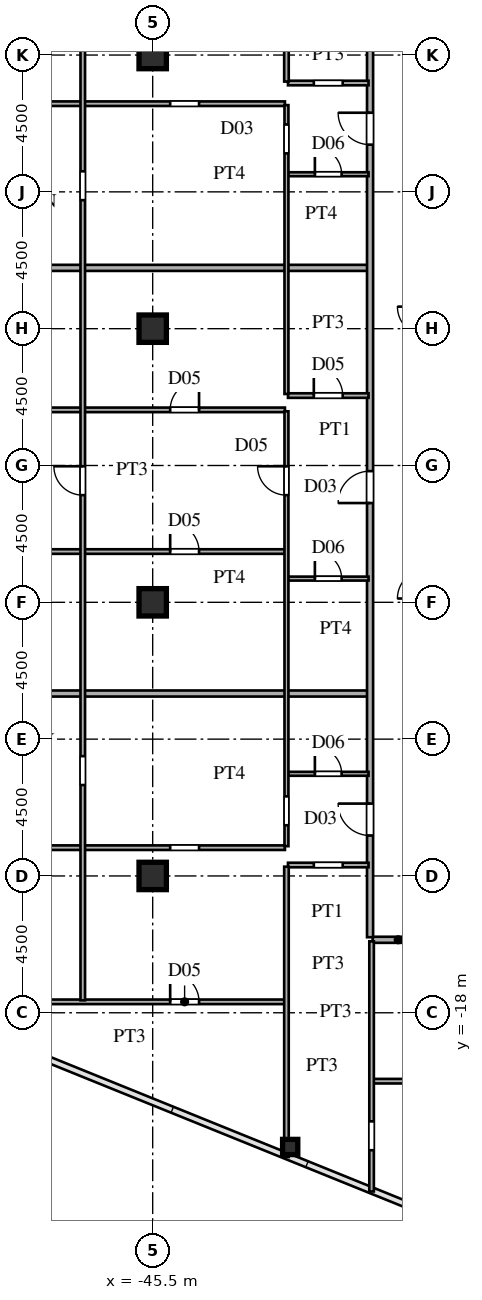
"""IFC4 building model, lengths in metres.
Left out: names, types, materials, properties, quantities, classifications, styles, units other than length and angle.
Written with IfcOpenShell. Run it as: python <this file> out.ifc"""

import sys

from ifc_helpers import new_model, si_unit, direction, frame, frame_2d, origin, origin_2d, place, context, subcontext, project, spatial, rectangle, hollow_rectangle, i_section, extrude, source, transform, mapped, element, fill, save


model = new_model("IFC4")
c1 = context("Model", 3, precision=1e-05, world=origin(), true_north=direction((0.0, 1.0)))
c2 = subcontext(c1, "Body", "Model", "MODEL_VIEW")
j1 = project(units=[si_unit("LENGTHUNIT", "METRE"), si_unit("PLANEANGLEUNIT", "RADIAN")], contexts=[c1])
p1 = place(None, origin())
s1 = spatial("IfcSite", under=j1, at=p1, CompositionType="ELEMENT")
p2 = place(p1, origin())
s2 = spatial("IfcBuilding", under=s1, at=p2, CompositionType="ELEMENT")
p3 = place(p2, frame((0.0, 0.0, 18.9)))
s3 = spatial("IfcBuildingStorey", under=s2, at=p3, CompositionType="ELEMENT", Elevation=18.9)
m1 = source(origin(), c2, "Body", "SweptSolid", [
    extrude(i_section(OverallWidth=0.9, OverallDepth=0.9, WebThickness=0.036, FlangeThickness=0.055, at=origin_2d()), origin(), (0.0, 0.0, 1.0), 3.6),
])
for number, where, z_axis, x_axis in (
    (1, (-45.5, -13.5, 0.0), (0.0, 0.0, 1.0), (1.0, 0.0, 0.0)),
    (2, (-45.5, -4.5, 0.0), (0.0, 0.0, 1.0), (1.0, 0.0, 0.0)),
    (3, (-45.5, 4.5, 0.0), (0.0, 0.0, 1.0), (1.0, 0.0, 0.0)),
    (4, (-45.5, 13.5, 0.0), (0.0, 0.0, 1.0), (1.0, 0.0, 0.0)),
):
    element("IfcColumn", number, at=place(p3, frame(where, z_axis=z_axis, x_axis=x_axis)), inside=s3, PredefinedType="COLUMN", context=c2, shape_type="MappedRepresentation", body=[
        mapped(m1, transform((0.0, 0.0, 0.0), scale=1.0)),
    ])
m2 = source(origin(), c2, "Body", "SweptSolid", [
    extrude(hollow_rectangle(XDim=0.5, YDim=0.5, WallThickness=0.02, at=origin_2d()), origin(), (0.0, 0.0, 1.0), 3.6),
])
p4 = place(p3, frame((-40.977, -22.414, 0.0), z_axis=(0.0, 0.0, 1.0), x_axis=(1.0, 0.0, 0.0)))
e5 = element("IfcColumn", 5, at=p4, inside=s3, PredefinedType="COLUMN", context=c2, shape_type="MappedRepresentation", body=[
    mapped(m2, transform((0.0, 0.0, 0.0), scale=1.0)),
])
p5 = place(p3, frame((-38.25, -20.25, 0.0), z_axis=(0.0, 0.0, 1.0), x_axis=(1.0, 0.0, 0.0)))
e6 = element("IfcWall", 6, at=p5, inside=s3, PredefinedType="PARTITIONING", context=c2, shape_type="SweptSolid", body=[
    extrude(rectangle(XDim=10.785, YDim=0.15, at=frame_2d((5.393, 0.0))), origin(), (0.0, 0.0, 1.0), 3.38),
])
p6 = place(p5, frame((4.875, 0.0, 0.0)))
e7 = element("IfcOpeningElement", 7, at=p6, cuts=e6, PredefinedType="OPENING", context=c2, shape_type="SweptSolid", body=[
    extrude(rectangle(XDim=0.95, YDim=2.15, at=frame_2d((0.475, 1.075))), frame((0.0, 0.085, 0.0), z_axis=(0.0, -1.0, 0.0), x_axis=(1.0, 0.0, 0.0)), (0.0, 0.0, 1.0), 0.17),
])
p7 = place(p3, frame((-53.66, -17.64, 0.0), z_axis=(0.0, 0.0, 1.0), x_axis=(1.0, 0.0, 0.0)))
e8 = element("IfcWall", 8, at=p7, inside=s3, PredefinedType="PARTITIONING", context=c2, shape_type="SweptSolid", body=[
    extrude(rectangle(XDim=12.51, YDim=0.15, at=frame_2d((6.255, 0.0))), origin(), (0.0, 0.0, 1.0), 3.38),
])
p8 = place(p7, frame((8.735, 0.0, 0.0)))
e9 = element("IfcOpeningElement", 9, at=p8, cuts=e8, PredefinedType="OPENING", context=c2, shape_type="SweptSolid", body=[
    extrude(rectangle(XDim=0.95, YDim=2.15, at=frame_2d((0.475, 1.075))), frame((0.0, 0.085, 0.0), z_axis=(0.0, -1.0, 0.0), x_axis=(1.0, 0.0, 0.0)), (0.0, 0.0, 1.0), 0.17),
])
p9 = place(p7, frame((2.659, 0.0, 0.0)))
e10 = element("IfcOpeningElement", 10, at=p9, cuts=e8, PredefinedType="OPENING", context=c2, shape_type="SweptSolid", body=[
    extrude(rectangle(XDim=0.95, YDim=2.15, at=frame_2d((0.475, 1.075))), frame((0.0, 0.085, 0.0), z_axis=(0.0, -1.0, 0.0), x_axis=(1.0, 0.0, 0.0)), (0.0, 0.0, 1.0), 0.17),
])
p10 = place(p3, frame((-38.265, -15.6, 0.0), z_axis=(0.0, 0.0, 1.0), x_axis=(1.0, 0.0, 0.0)))
e11 = element("IfcWall", 11, at=p10, inside=s3, PredefinedType="PARTITIONING", context=c2, shape_type="SweptSolid", body=[
    extrude(rectangle(XDim=1.68, YDim=0.2, at=frame_2d((0.84, 0.0))), origin(), (0.0, 0.0, 1.0), 3.38),
])
p11 = place(p3, frame((-41.05, -13.14, 0.0), z_axis=(0.0, 0.0, 1.0), x_axis=(1.0, 0.0, 0.0)))
e12 = element("IfcWall", 12, at=p11, inside=s3, PredefinedType="PARTITIONING", context=c2, shape_type="SweptSolid", body=[
    extrude(rectangle(XDim=2.65, YDim=0.15, at=frame_2d((1.325, 0.0))), origin(), (0.0, 0.0, 1.0), 3.38),
])
p12 = place(p11, frame((0.85, 0.0, 0.0)))
e13 = element("IfcOpeningElement", 13, at=p12, cuts=e12, PredefinedType="OPENING", context=c2, shape_type="SweptSolid", body=[
    extrude(rectangle(XDim=0.95, YDim=2.15, at=frame_2d((0.475, 1.075))), frame((0.0, 0.085, 0.0), z_axis=(0.0, -1.0, 0.0), x_axis=(1.0, 0.0, 0.0)), (0.0, 0.0, 1.0), 0.17),
])
p13 = place(p3, frame((-66.186, -12.57, 0.0), z_axis=(0.0, 0.0, 1.0), x_axis=(1.0, 0.0, 0.0)))
e14 = element("IfcWall", 14, at=p13, inside=s3, PredefinedType="PARTITIONING", context=c2, shape_type="SweptSolid", body=[
    extrude(rectangle(XDim=25.036, YDim=0.15, at=frame_2d((12.518, 0.0))), origin(), (0.0, 0.0, 1.0), 3.38),
])
p14 = place(p13, frame((21.261, 0.0, 0.0)))
e15 = element("IfcOpeningElement", 15, at=p14, cuts=e14, PredefinedType="OPENING", context=c2, shape_type="SweptSolid", body=[
    extrude(rectangle(XDim=0.95, YDim=2.15, at=frame_2d((0.475, 1.075))), frame((0.0, 0.085, 0.0), z_axis=(0.0, -1.0, 0.0), x_axis=(1.0, 0.0, 0.0)), (0.0, 0.0, 1.0), 0.17),
])
p15 = place(p13, frame((8.361, 0.0, 0.0)))
e16 = element("IfcOpeningElement", 16, at=p15, cuts=e14, PredefinedType="OPENING", context=c2, shape_type="SweptSolid", body=[
    extrude(rectangle(XDim=0.95, YDim=2.15, at=frame_2d((0.475, 1.075))), frame((0.0, 0.085, 0.0), z_axis=(0.0, -1.0, 0.0), x_axis=(1.0, 0.0, 0.0)), (0.0, 0.0, 1.0), 0.17),
])
p16 = place(p3, frame((-41.05, -10.14, 0.0), z_axis=(0.0, 0.0, 1.0), x_axis=(1.0, 0.0, 0.0)))
e17 = element("IfcWall", 17, at=p16, inside=s3, PredefinedType="PARTITIONING", context=c2, shape_type="SweptSolid", body=[
    extrude(rectangle(XDim=2.65, YDim=0.13, at=frame_2d((1.325, 0.0))), origin(), (0.0, 0.0, 1.0), 3.38),
])
p17 = place(p16, frame((0.885, 0.0, 0.0)))
e18 = element("IfcOpeningElement", 18, at=p17, cuts=e17, PredefinedType="OPENING", context=c2, shape_type="SweptSolid", body=[
    extrude(rectangle(XDim=0.88, YDim=2.1, at=frame_2d((0.44, 1.05))), frame((0.0, 0.075, 0.0), z_axis=(0.0, -1.0, 0.0), x_axis=(1.0, 0.0, 0.0)), (0.0, 0.0, 1.0), 0.15),
])
p18 = place(p3, frame((-72.505, -7.5, 0.0), z_axis=(0.0, 0.0, 1.0), x_axis=(1.0, 0.0, 0.0)))
e19 = element("IfcWall", 19, at=p18, inside=s3, PredefinedType="PARTITIONING", context=c2, shape_type="SweptSolid", body=[
    extrude(rectangle(XDim=34.075, YDim=0.2, at=frame_2d((17.038, 0.0))), origin(), (0.0, 0.0, 1.0), 3.38),
])
p19 = place(p3, frame((-41.05, -3.72, 0.0), z_axis=(0.0, 0.0, 1.0), x_axis=(1.0, 0.0, 0.0)))
e20 = element("IfcWall", 20, at=p19, inside=s3, PredefinedType="PARTITIONING", context=c2, shape_type="SweptSolid", body=[
    extrude(rectangle(XDim=2.65, YDim=0.13, at=frame_2d((1.325, 0.0))), origin(), (0.0, 0.0, 1.0), 3.38),
])
p20 = place(p19, frame((0.885, 0.0, 0.0)))
e21 = element("IfcOpeningElement", 21, at=p20, cuts=e20, PredefinedType="OPENING", context=c2, shape_type="SweptSolid", body=[
    extrude(rectangle(XDim=0.88, YDim=2.1, at=frame_2d((0.44, 1.05))), frame((0.0, 0.075, 0.0), z_axis=(0.0, -1.0, 0.0), x_axis=(1.0, 0.0, 0.0)), (0.0, 0.0, 1.0), 0.15),
])
p21 = place(p3, frame((-72.535, -2.83, 0.0), z_axis=(0.0, 0.0, 1.0), x_axis=(1.0, 0.0, 0.0)))
e22 = element("IfcWall", 22, at=p21, inside=s3, PredefinedType="PARTITIONING", context=c2, shape_type="SweptSolid", body=[
    extrude(rectangle(XDim=31.385, YDim=0.15, at=frame_2d((15.692, 0.0))), origin(), (0.0, 0.0, 1.0), 3.38),
])
p22 = place(p21, frame((27.61, 0.0, 0.0)))
e23 = element("IfcOpeningElement", 23, at=p22, cuts=e22, PredefinedType="OPENING", context=c2, shape_type="SweptSolid", body=[
    extrude(rectangle(XDim=0.95, YDim=2.15, at=frame_2d((0.475, 1.075))), frame((0.0, 0.085, 0.0), z_axis=(0.0, -1.0, 0.0), x_axis=(1.0, 0.0, 0.0)), (0.0, 0.0, 1.0), 0.17),
])
p23 = place(p21, frame((14.71, 0.0, 0.0)))
e24 = element("IfcOpeningElement", 24, at=p23, cuts=e22, PredefinedType="OPENING", context=c2, shape_type="SweptSolid", body=[
    extrude(rectangle(XDim=0.95, YDim=2.15, at=frame_2d((0.475, 1.075))), frame((0.0, 0.085, 0.0), z_axis=(0.0, -1.0, 0.0), x_axis=(1.0, 0.0, 0.0)), (0.0, 0.0, 1.0), 0.17),
])
p24 = place(p3, frame((-72.535, 1.83, 0.0), z_axis=(0.0, 0.0, 1.0), x_axis=(1.0, 0.0, 0.0)))
e25 = element("IfcWall", 25, at=p24, inside=s3, PredefinedType="PARTITIONING", context=c2, shape_type="SweptSolid", body=[
    extrude(rectangle(XDim=31.385, YDim=0.15, at=frame_2d((15.692, 0.0))), origin(), (0.0, 0.0, 1.0), 3.38),
])
p25 = place(p24, frame((27.61, 0.0, 0.0)))
e26 = element("IfcOpeningElement", 26, at=p25, cuts=e25, PredefinedType="OPENING", context=c2, shape_type="SweptSolid", body=[
    extrude(rectangle(XDim=0.95, YDim=2.15, at=frame_2d((0.475, 1.075))), frame((0.0, 0.085, 0.0), z_axis=(0.0, -1.0, 0.0), x_axis=(1.0, 0.0, 0.0)), (0.0, 0.0, 1.0), 0.17),
])
p26 = place(p24, frame((14.71, 0.0, 0.0)))
e27 = element("IfcOpeningElement", 27, at=p26, cuts=e25, PredefinedType="OPENING", context=c2, shape_type="SweptSolid", body=[
    extrude(rectangle(XDim=0.95, YDim=2.15, at=frame_2d((0.475, 1.075))), frame((0.0, 0.085, 0.0), z_axis=(0.0, -1.0, 0.0), x_axis=(1.0, 0.0, 0.0)), (0.0, 0.0, 1.0), 0.17),
])
p27 = place(p3, frame((-41.05, 2.3, 0.0), z_axis=(0.0, 0.0, 1.0), x_axis=(1.0, 0.0, 0.0)))
e28 = element("IfcWall", 28, at=p27, inside=s3, PredefinedType="PARTITIONING", context=c2, shape_type="SweptSolid", body=[
    extrude(rectangle(XDim=2.65, YDim=0.15, at=frame_2d((1.325, 0.0))), origin(), (0.0, 0.0, 1.0), 3.38),
])
p28 = place(p27, frame((0.85, 0.0, 0.0)))
e29 = element("IfcOpeningElement", 29, at=p28, cuts=e28, PredefinedType="OPENING", context=c2, shape_type="SweptSolid", body=[
    extrude(rectangle(XDim=0.95, YDim=2.15, at=frame_2d((0.475, 1.075))), frame((0.0, 0.085, 0.0), z_axis=(0.0, -1.0, 0.0), x_axis=(1.0, 0.0, 0.0)), (0.0, 0.0, 1.0), 0.17),
])
p29 = place(p3, frame((-72.505, 6.5, 0.0), z_axis=(0.0, 0.0, 1.0), x_axis=(1.0, 0.0, 0.0)))
e30 = element("IfcWall", 30, at=p29, inside=s3, PredefinedType="PARTITIONING", context=c2, shape_type="SweptSolid", body=[
    extrude(rectangle(XDim=34.075, YDim=0.2, at=frame_2d((17.038, 0.0))), origin(), (0.0, 0.0, 1.0), 3.38),
])
p30 = place(p3, frame((-41.05, 9.58, 0.0), z_axis=(0.0, 0.0, 1.0), x_axis=(1.0, 0.0, 0.0)))
e31 = element("IfcWall", 31, at=p30, inside=s3, PredefinedType="PARTITIONING", context=c2, shape_type="SweptSolid", body=[
    extrude(rectangle(XDim=2.65, YDim=0.13, at=frame_2d((1.325, 0.0))), origin(), (0.0, 0.0, 1.0), 3.38),
])
p31 = place(p30, frame((0.885, 0.0, 0.0)))
e32 = element("IfcOpeningElement", 32, at=p31, cuts=e31, PredefinedType="OPENING", context=c2, shape_type="SweptSolid", body=[
    extrude(rectangle(XDim=0.88, YDim=2.1, at=frame_2d((0.44, 1.05))), frame((0.0, 0.075, 0.0), z_axis=(0.0, -1.0, 0.0), x_axis=(1.0, 0.0, 0.0)), (0.0, 0.0, 1.0), 0.15),
])
p32 = place(p3, frame((-67.833, 11.9, 0.0), z_axis=(0.0, 0.0, 1.0), x_axis=(1.0, 0.0, 0.0)))
e33 = element("IfcWall", 33, at=p32, inside=s3, PredefinedType="PARTITIONING", context=c2, shape_type="SweptSolid", body=[
    extrude(rectangle(XDim=26.683, YDim=0.15, at=frame_2d((13.342, 0.0))), origin(), (0.0, 0.0, 1.0), 3.38),
])
p33 = place(p32, frame((22.908, 0.0, 0.0)))
e34 = element("IfcOpeningElement", 34, at=p33, cuts=e33, PredefinedType="OPENING", context=c2, shape_type="SweptSolid", body=[
    extrude(rectangle(XDim=0.95, YDim=2.15, at=frame_2d((0.475, 1.075))), frame((0.0, 0.085, 0.0), z_axis=(0.0, -1.0, 0.0), x_axis=(1.0, 0.0, 0.0)), (0.0, 0.0, 1.0), 0.17),
])
p34 = place(p32, frame((3.359, 0.0, 0.0)))
e35 = element("IfcOpeningElement", 35, at=p34, cuts=e33, PredefinedType="OPENING", context=c2, shape_type="SweptSolid", body=[
    extrude(rectangle(XDim=0.95, YDim=2.15, at=frame_2d((0.475, 1.075))), frame((0.0, 0.085, 0.0), z_axis=(0.0, -1.0, 0.0), x_axis=(1.0, 0.0, 0.0)), (0.0, 0.0, 1.0), 0.17),
])
p35 = place(p32, frame((16.208, 0.0, 0.0)))
e36 = element("IfcOpeningElement", 36, at=p35, cuts=e33, PredefinedType="OPENING", context=c2, shape_type="SweptSolid", body=[
    extrude(rectangle(XDim=0.95, YDim=2.15, at=frame_2d((0.475, 1.075))), frame((0.0, 0.085, 0.0), z_axis=(0.0, -1.0, 0.0), x_axis=(1.0, 0.0, 0.0)), (0.0, 0.0, 1.0), 0.17),
])
p36 = place(p3, frame((-41.05, 12.58, 0.0), z_axis=(0.0, 0.0, 1.0), x_axis=(1.0, 0.0, 0.0)))
e37 = element("IfcWall", 37, at=p36, inside=s3, PredefinedType="PARTITIONING", context=c2, shape_type="SweptSolid", body=[
    extrude(rectangle(XDim=2.65, YDim=0.15, at=frame_2d((1.325, 0.0))), origin(), (0.0, 0.0, 1.0), 3.38),
])
p37 = place(p36, frame((0.85, 0.0, 0.0)))
e38 = element("IfcOpeningElement", 38, at=p37, cuts=e37, PredefinedType="OPENING", context=c2, shape_type="SweptSolid", body=[
    extrude(rectangle(XDim=0.95, YDim=2.15, at=frame_2d((0.475, 1.075))), frame((0.0, 0.085, 0.0), z_axis=(0.0, -1.0, 0.0), x_axis=(1.0, 0.0, 0.0)), (0.0, 0.0, 1.0), 0.17),
])
p38 = place(p3, frame((-47.8, -17.59, 0.0), z_axis=(0.0, 0.0, 1.0), x_axis=(0.0, 1.0, 0.0)))
e39 = element("IfcWall", 39, at=p38, inside=s3, PredefinedType="PARTITIONING", context=c2, shape_type="SweptSolid", body=[
    extrude(rectangle(XDim=34.846, YDim=0.15, at=frame_2d((17.423, 0.0))), origin(), (0.0, 0.0, 1.0), 3.38),
])
p39 = place(p38, frame((7.08, 0.0, 0.0)))
e40 = element("IfcOpeningElement", 40, at=p39, cuts=e39, PredefinedType="OPENING", context=c2, shape_type="SweptSolid", body=[
    extrude(rectangle(XDim=0.95, YDim=2.15, at=frame_2d((0.475, 1.075))), frame((0.0, 0.085, 0.0), z_axis=(0.0, -1.0, 0.0), x_axis=(1.0, 0.0, 0.0)), (0.0, 0.0, 1.0), 0.17),
])
p40 = place(p38, frame((16.615, 0.0, 0.0)))
e41 = element("IfcOpeningElement", 41, at=p40, cuts=e39, PredefinedType="OPENING", context=c2, shape_type="SweptSolid", body=[
    extrude(rectangle(XDim=0.95, YDim=2.15, at=frame_2d((0.475, 1.075))), frame((0.0, 0.085, 0.0), z_axis=(0.0, -1.0, 0.0), x_axis=(1.0, 0.0, 0.0)), (0.0, 0.0, 1.0), 0.17),
])
p41 = place(p38, frame((26.317, 0.0, 0.0)))
e42 = element("IfcOpeningElement", 42, at=p41, cuts=e39, PredefinedType="OPENING", context=c2, shape_type="SweptSolid", body=[
    extrude(rectangle(XDim=0.95, YDim=2.15, at=frame_2d((0.475, 1.075))), frame((0.0, 0.085, 0.0), z_axis=(0.0, -1.0, 0.0), x_axis=(1.0, 0.0, 0.0)), (0.0, 0.0, 1.0), 0.17),
])
p42 = place(p3, frame((-41.1, -22.744, 0.0), z_axis=(0.0, 0.0, 1.0), x_axis=(0.0, 1.0, 0.0)))
e43 = element("IfcWall", 43, at=p42, inside=s3, PredefinedType="PARTITIONING", context=c2, shape_type="SweptSolid", body=[
    extrude(rectangle(XDim=9.549, YDim=0.15, at=frame_2d((4.774, 0.0))), origin(), (0.0, 0.0, 1.0), 3.38),
])
p43 = place(p3, frame((-41.1, -12.52, 0.0), z_axis=(0.0, 0.0, 1.0), x_axis=(0.0, 1.0, 0.0)))
e44 = element("IfcWall", 44, at=p43, inside=s3, PredefinedType="PARTITIONING", context=c2, shape_type="SweptSolid", body=[
    extrude(rectangle(XDim=14.303, YDim=0.13, at=frame_2d((7.151, 0.0))), origin(), (0.0, 0.0, 1.0), 3.38),
])
p44 = place(p43, frame((0.688, 0.0, 0.0)))
e45 = element("IfcOpeningElement", 45, at=p44, cuts=e44, PredefinedType="OPENING", context=c2, shape_type="SweptSolid", body=[
    extrude(rectangle(XDim=0.95, YDim=2.15, at=frame_2d((0.475, 1.075))), frame((0.0, 0.075, 0.0), z_axis=(0.0, -1.0, 0.0), x_axis=(1.0, 0.0, 0.0)), (0.0, 0.0, 1.0), 0.15),
])
p45 = place(p43, frame((11.545, 0.0, 0.0)))
e46 = element("IfcOpeningElement", 46, at=p45, cuts=e44, PredefinedType="OPENING", context=c2, shape_type="SweptSolid", body=[
    extrude(rectangle(XDim=0.95, YDim=2.15, at=frame_2d((0.475, 1.075))), frame((0.0, 0.075, 0.0), z_axis=(0.0, -1.0, 0.0), x_axis=(1.0, 0.0, 0.0)), (0.0, 0.0, 1.0), 0.15),
])
p46 = place(p3, frame((-41.1, 2.352, 0.0), z_axis=(0.0, 0.0, 1.0), x_axis=(0.0, 1.0, 0.0)))
e47 = element("IfcWall", 47, at=p46, inside=s3, PredefinedType="PARTITIONING", context=c2, shape_type="SweptSolid", body=[
    extrude(rectangle(XDim=9.501, YDim=0.13, at=frame_2d((4.75, 0.0))), origin(), (0.0, 0.0, 1.0), 3.38),
])
p47 = place(p46, frame((7.913, 0.0, 0.0)))
e48 = element("IfcOpeningElement", 48, at=p47, cuts=e47, PredefinedType="OPENING", context=c2, shape_type="SweptSolid", body=[
    extrude(rectangle(XDim=0.95, YDim=2.15, at=frame_2d((0.475, 1.075))), frame((0.0, 0.075, 0.0), z_axis=(0.0, -1.0, 0.0), x_axis=(1.0, 0.0, 0.0)), (0.0, 0.0, 1.0), 0.15),
])
p48 = place(p3, frame((-41.1, 12.628, 0.0), z_axis=(0.0, 0.0, 1.0), x_axis=(0.0, 1.0, 0.0)))
e49 = element("IfcWall", 49, at=p48, inside=s3, PredefinedType="PARTITIONING", context=c2, shape_type="SweptSolid", body=[
    extrude(rectangle(XDim=10.116, YDim=0.15, at=frame_2d((5.058, 0.0))), origin(), (0.0, 0.0, 1.0), 2.99),
])
p49 = place(p3, frame((-38.35, -15.515, 0.0), z_axis=(0.0, 0.0, 1.0), x_axis=(0.0, 1.0, 0.0)))
e50 = element("IfcWall", 50, at=p49, inside=s3, PredefinedType="PARTITIONING", context=c2, shape_type="SweptSolid", body=[
    extrude(rectangle(XDim=31.03, YDim=0.2, at=frame_2d((15.515, 0.0))), origin(), (0.0, 0.0, 1.0), 3.38),
])
p50 = place(p49, frame((3.345, 0.0, 0.0)))
e51 = element("IfcOpeningElement", 51, at=p50, cuts=e50, PredefinedType="OPENING", context=c2, shape_type="SweptSolid", body=[
    extrude(rectangle(XDim=1.05, YDim=2.25, at=frame_2d((0.525, 1.125))), frame((0.0, 0.11, 0.0), z_axis=(0.0, -1.0, 0.0), x_axis=(1.0, 0.0, 0.0)), (0.0, 0.0, 1.0), 0.22),
])
p51 = place(p49, frame((14.28, 0.0, 0.0)))
e52 = element("IfcOpeningElement", 52, at=p51, cuts=e50, PredefinedType="OPENING", context=c2, shape_type="SweptSolid", body=[
    extrude(rectangle(XDim=1.05, YDim=2.25, at=frame_2d((0.525, 1.125))), frame((0.0, 0.11, 0.0), z_axis=(0.0, -1.0, 0.0), x_axis=(1.0, 0.0, 0.0)), (0.0, 0.0, 1.0), 0.22),
])
p52 = place(p49, frame((26.067, 0.0, 0.0)))
e53 = element("IfcOpeningElement", 53, at=p52, cuts=e50, PredefinedType="OPENING", context=c2, shape_type="SweptSolid", body=[
    extrude(rectangle(XDim=1.05, YDim=2.25, at=frame_2d((0.525, 1.125))), frame((0.0, 0.11, 0.0), z_axis=(0.0, -1.0, 0.0), x_axis=(1.0, 0.0, 0.0)), (0.0, 0.0, 1.0), 0.22),
])
p53 = place(p3, frame((-38.3, -23.878, 0.0), z_axis=(0.0, 0.0, 1.0), x_axis=(0.0, 1.0, 0.0)))
e54 = element("IfcWall", 54, at=p53, inside=s3, PredefinedType="PARTITIONING", context=c2, shape_type="SweptSolid", body=[
    extrude(rectangle(XDim=8.228, YDim=0.15, at=frame_2d((4.114, 0.0))), origin(), (0.0, 0.0, 1.0), 3.38),
])
p54 = place(p53, frame((1.357, 0.0, 0.0)))
e55 = element("IfcOpeningElement", 55, at=p54, cuts=e54, PredefinedType="OPENING", context=c2, shape_type="SweptSolid", body=[
    extrude(rectangle(XDim=0.95, YDim=2.15, at=frame_2d((0.475, 1.075))), frame((0.0, 0.085, 0.0), z_axis=(0.0, -1.0, 0.0), x_axis=(1.0, 0.0, 0.0)), (0.0, 0.0, 1.0), 0.17),
])
m3 = source(origin(), c2, "Body", "SweptSolid", [
    extrude(rectangle(XDim=0.95, YDim=2.15, at=frame_2d((0.475, 1.075))), frame((0.0, 0.025, 0.0), z_axis=(0.0, -1.0, 0.0), x_axis=(1.0, 0.0, 0.0)), (0.0, 0.0, 1.0), 0.05),
])
p55 = place(p8, origin())
e56 = element("IfcDoor", 56, at=p55, inside=s3, OperationType="SINGLE_SWING_LEFT", PredefinedType="DOOR", context=c2, shape_type="MappedRepresentation", body=[
    mapped(m3, transform((0.0, 0.0, 0.0), scale=1.0)),
])
fill(e9, e56)
m4 = source(origin(), c2, "Body", "SweptSolid", [
    extrude(rectangle(XDim=0.88, YDim=2.1, at=frame_2d((0.44, 1.05))), frame((0.0, 0.025, 0.0), z_axis=(0.0, -1.0, 0.0), x_axis=(1.0, 0.0, 0.0)), (0.0, 0.0, 1.0), 0.05),
])
p56 = place(p17, origin())
e57 = element("IfcDoor", 57, at=p56, inside=s3, OperationType="SINGLE_SWING_LEFT", PredefinedType="DOOR", context=c2, shape_type="MappedRepresentation", body=[
    mapped(m4, transform((0.0, 0.0, 0.0), scale=1.0)),
])
fill(e18, e57)
p57 = place(p20, origin())
e58 = element("IfcDoor", 58, at=p57, inside=s3, OperationType="SINGLE_SWING_LEFT", PredefinedType="DOOR", context=c2, shape_type="MappedRepresentation", body=[
    mapped(m4, transform((0.0, 0.0, 0.0), scale=1.0)),
])
fill(e21, e58)
p58 = place(p22, origin())
e59 = element("IfcDoor", 59, at=p58, inside=s3, OperationType="SINGLE_SWING_LEFT", PredefinedType="DOOR", context=c2, shape_type="MappedRepresentation", body=[
    mapped(m3, transform((0.0, 0.0, 0.0), scale=1.0)),
])
fill(e23, e59)
p59 = place(p25, origin())
e60 = element("IfcDoor", 60, at=p59, inside=s3, OperationType="SINGLE_SWING_RIGHT", PredefinedType="DOOR", context=c2, shape_type="MappedRepresentation", body=[
    mapped(m3, transform((0.0, 0.0, 0.0), scale=1.0)),
])
fill(e26, e60)
p60 = place(p28, origin())
e61 = element("IfcDoor", 61, at=p60, inside=s3, OperationType="SINGLE_SWING_LEFT", PredefinedType="DOOR", context=c2, shape_type="MappedRepresentation", body=[
    mapped(m3, transform((0.0, 0.0, 0.0), scale=1.0)),
])
fill(e29, e61)
p61 = place(p31, origin())
e62 = element("IfcDoor", 62, at=p61, inside=s3, OperationType="SINGLE_SWING_LEFT", PredefinedType="DOOR", context=c2, shape_type="MappedRepresentation", body=[
    mapped(m4, transform((0.0, 0.0, 0.0), scale=1.0)),
])
fill(e32, e62)
p62 = place(p40, origin())
e63 = element("IfcDoor", 63, at=p62, inside=s3, OperationType="SINGLE_SWING_RIGHT", PredefinedType="DOOR", context=c2, shape_type="MappedRepresentation", body=[
    mapped(m3, transform((0.0, 0.0, 0.0), scale=1.0)),
])
fill(e41, e63)
p63 = place(p45, origin())
e64 = element("IfcDoor", 64, at=p63, inside=s3, OperationType="SINGLE_SWING_RIGHT", PredefinedType="DOOR", context=c2, shape_type="MappedRepresentation", body=[
    mapped(m3, transform((0.0, 0.0, 0.0), scale=1.0)),
])
fill(e46, e64)
m5 = source(origin(), c2, "Body", "SweptSolid", [
    extrude(rectangle(XDim=1.05, YDim=2.25, at=frame_2d((0.525, 1.125))), frame((0.0, 0.025, 0.0), z_axis=(0.0, -1.0, 0.0), x_axis=(1.0, 0.0, 0.0)), (0.0, 0.0, 1.0), 0.05),
])
p64 = place(p50, origin())
e65 = element("IfcDoor", 65, at=p64, inside=s3, OperationType="SINGLE_SWING_RIGHT", PredefinedType="DOOR", context=c2, shape_type="MappedRepresentation", body=[
    mapped(m5, transform((0.0, 0.0, 0.0), scale=1.0)),
])
fill(e51, e65)
p65 = place(p51, origin())
e66 = element("IfcDoor", 66, at=p65, inside=s3, OperationType="SINGLE_SWING_LEFT", PredefinedType="DOOR", context=c2, shape_type="MappedRepresentation", body=[
    mapped(m5, transform((0.0, 0.0, 0.0), scale=1.0)),
])
fill(e52, e66)
p66 = place(p52, origin())
e67 = element("IfcDoor", 67, at=p66, inside=s3, OperationType="SINGLE_SWING_RIGHT", PredefinedType="DOOR", context=c2, shape_type="MappedRepresentation", body=[
    mapped(m5, transform((0.0, 0.0, 0.0), scale=1.0)),
])
fill(e53, e67)
save(model, sys.argv[1])
